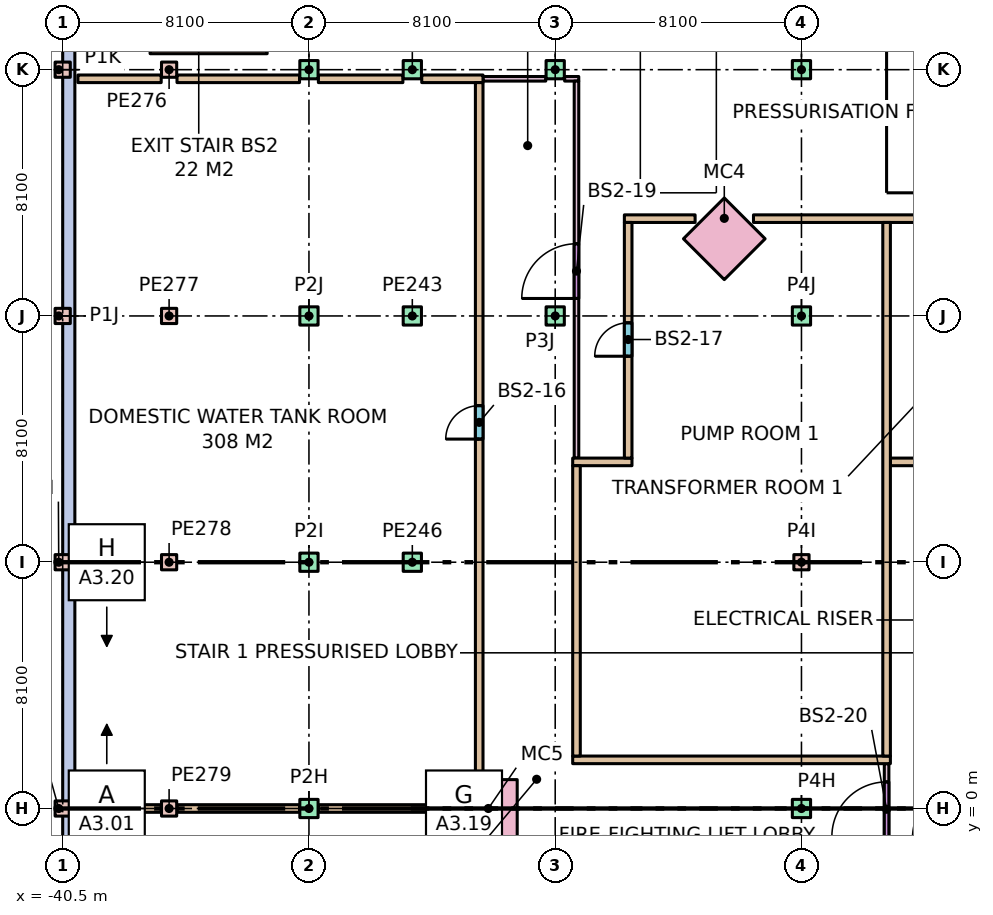
"""IFC4 building model, lengths in metres.
Left out: names, types, materials, properties, quantities, classifications, styles, units other than length and angle.
Written with IfcOpenShell. Run it as: python <this file> out.ifc"""

import sys

from ifc_helpers import new_model, si_unit, direction, frame, frame_2d, origin, origin_2d, place, context, subcontext, project, spatial, rectangle, extrude, element, fill, save


model = new_model("IFC4")
c1 = context("Model", 3, precision=1e-05, world=origin(), true_north=direction((0.0, 1.0)))
c2 = subcontext(c1, "Body", "Model", "MODEL_VIEW")
j1 = project(units=[si_unit("LENGTHUNIT", "METRE"), si_unit("PLANEANGLEUNIT", "RADIAN")], contexts=[c1])
p1 = place(None, origin())
s1 = spatial("IfcSite", under=j1, at=p1, CompositionType="ELEMENT")
p2 = place(p1, origin())
s2 = spatial("IfcBuilding", under=s1, at=p2, CompositionType="ELEMENT")
p3 = place(p2, frame((0.0, 0.0, -7.2)))
s3 = spatial("IfcBuildingStorey", under=s2, at=p3, CompositionType="ELEMENT", Elevation=-7.2)
p4 = place(p3, frame((-40.3, -56.3, 0.0), z_axis=(0.0, 0.0, 1.0), x_axis=(0.0, 1.0, 0.0)))
e1 = element("IfcWall", 1, at=p4, inside=s3, PredefinedType="SOLIDWALL", context=c2, shape_type="SweptSolid", body=[
    extrude(rectangle(XDim=112.6, YDim=0.4, at=frame_2d((56.3, 0.0))), origin(), (0.0, 0.0, 1.0), 3.6),
])
for number, where, z_axis, x_axis in (
    (2, (-40.5, 0.0, 0.0), (0.0, 0.0, 1.0), (1.0, 0.0, 0.0)),
    (3, (-40.5, 8.1, 0.0), (0.0, 0.0, 1.0), (1.0, 0.0, 0.0)),
    (4, (-40.5, 16.2, 0.0), (0.0, 0.0, 1.0), (1.0, 0.0, 0.0)),
    (5, (-40.5, 24.3, 0.0), (0.0, 0.0, 1.0), (1.0, 0.0, 0.0)),
):
    element("IfcColumn", number, at=place(p3, frame(where, z_axis=z_axis, x_axis=x_axis)), inside=s3, PredefinedType="COLUMN", context=c2, shape_type="SweptSolid", body=[
        extrude(rectangle(XDim=0.5, YDim=0.5, at=origin_2d()), origin(), (0.0, 0.0, 1.0), 3.6),
    ])
for number, where, z_axis, x_axis in (
    (6, (-32.4, 0.0, 0.0), (0.0, 0.0, 1.0), (1.0, 0.0, 0.0)),
    (7, (-32.4, 8.1, 0.0), (0.0, 0.0, 1.0), (1.0, 0.0, 0.0)),
    (8, (-32.4, 16.2, 0.0), (0.0, 0.0, 1.0), (1.0, 0.0, 0.0)),
    (9, (-32.4, 24.3, 0.0), (0.0, 0.0, 1.0), (1.0, 0.0, 0.0)),
    (10, (-24.3, 16.2, 0.0), (0.0, 0.0, 1.0), (1.0, 0.0, 0.0)),
    (11, (-24.3, 24.3, 0.0), (0.0, 0.0, 1.0), (1.0, 0.0, 0.0)),
    (12, (-16.2, 0.0, 0.0), (0.0, 0.0, 1.0), (1.0, 0.0, 0.0)),
):
    element("IfcColumn", number, at=place(p3, frame(where, z_axis=z_axis, x_axis=x_axis)), inside=s3, PredefinedType="COLUMN", context=c2, shape_type="SweptSolid", body=[
        extrude(rectangle(XDim=0.6, YDim=0.6, at=origin_2d()), origin(), (0.0, 0.0, 1.0), 3.6),
    ])
p5 = place(p3, frame((-16.2, 8.1, 0.0), z_axis=(0.0, 0.0, 1.0), x_axis=(1.0, 0.0, 0.0)))
e13 = element("IfcColumn", 13, at=p5, inside=s3, PredefinedType="COLUMN", context=c2, shape_type="SweptSolid", body=[
    extrude(rectangle(XDim=0.5, YDim=0.5, at=origin_2d()), origin(), (0.0, 0.0, 1.0), 3.6),
])
for number, where, z_axis, x_axis in (
    (14, (-16.2, 16.2, 0.0), (0.0, 0.0, 1.0), (1.0, 0.0, 0.0)),
    (15, (-16.2, 24.3, 0.0), (0.0, 0.0, 1.0), (1.0, 0.0, 0.0)),
    (16, (-29.0, 24.3, 0.0), (0.0, 0.0, 1.0), (1.0, 0.0, 0.0)),
    (17, (-29.0, 16.2, 0.0), (0.0, 0.0, 1.0), (1.0, 0.0, 0.0)),
    (18, (-29.0, 8.1, 0.0), (0.0, 0.0, 1.0), (1.0, 0.0, 0.0)),
):
    element("IfcColumn", number, at=place(p3, frame(where, z_axis=z_axis, x_axis=x_axis)), inside=s3, PredefinedType="COLUMN", context=c2, shape_type="SweptSolid", body=[
        extrude(rectangle(XDim=0.6, YDim=0.6, at=origin_2d()), origin(), (0.0, 0.0, 1.0), 3.6),
    ])
for number, where, z_axis, x_axis in (
    (19, (-37.0, 24.3, 0.0), (0.0, 0.0, 1.0), (1.0, 0.0, 0.0)),
    (20, (-37.0, 16.2, 0.0), (0.0, 0.0, 1.0), (1.0, 0.0, 0.0)),
    (21, (-37.0, 8.1, 0.0), (0.0, 0.0, 1.0), (1.0, 0.0, 0.0)),
    (22, (-37.0, 0.0, 0.0), (0.0, 0.0, 1.0), (1.0, 0.0, 0.0)),
):
    element("IfcColumn", number, at=place(p3, frame(where, z_axis=z_axis, x_axis=x_axis)), inside=s3, PredefinedType="COLUMN", context=c2, shape_type="SweptSolid", body=[
        extrude(rectangle(XDim=0.5, YDim=0.5, at=origin_2d()), origin(), (0.0, 0.0, 1.0), 3.6),
    ])
for number, where, z_axis, x_axis in (
    (23, (-18.738, 18.738, 0.0), (0.0, 0.0, 1.0), (-0.707, -0.707, 0.0)),
    (24, (-26.5, 0.0, 0.0), (0.0, 0.0, 1.0), (0.0, -1.0, 0.0)),
):
    element("IfcColumn", number, at=place(p3, frame(where, z_axis=z_axis, x_axis=x_axis)), inside=s3, PredefinedType="COLUMN", context=c2, shape_type="SweptSolid", body=[
        extrude(rectangle(XDim=1.9, YDim=1.9, at=origin_2d()), origin(), (0.0, 0.0, 1.0), 3.6),
    ])
p6 = place(p3, frame((-37.625, 24.95, 0.0), z_axis=(0.0, 0.0, 1.0), x_axis=(1.0, 0.0, 0.0)))
e25 = element("IfcWall", 25, at=p6, inside=s3, PredefinedType="STANDARD", context=c2, shape_type="SweptSolid", body=[
    extrude(rectangle(XDim=3.85, YDim=0.25, at=frame_2d((1.925, 0.0))), origin(), (0.0, 0.0, 1.0), 3.28),
])
p7 = place(p3, frame((-13.275, 11.4, 0.0), z_axis=(0.0, 0.0, 1.0), x_axis=(1.0, 0.0, 0.0)))
e26 = element("IfcWall", 26, at=p7, inside=s3, PredefinedType="PARTITIONING", context=c2, shape_type="SweptSolid", body=[
    extrude(rectangle(XDim=34.55, YDim=0.25, at=frame_2d((17.275, 0.0))), origin(), (0.0, 0.0, 1.0), 3.28),
])
p8 = place(p3, frame((-26.675, 24.0, 0.0), z_axis=(0.0, 0.0, 1.0), x_axis=(1.0, 0.0, 0.0)))
e27 = element("IfcWall", 27, at=p8, inside=s3, PredefinedType="PARTITIONING", context=c2, shape_type="SweptSolid", body=[
    extrude(rectangle(XDim=2.065, YDim=0.15, at=frame_2d((1.032, 0.0))), origin(), (0.0, 0.0, 1.0), 3.28),
])
p9 = place(p3, frame((-23.99, 24.0, 0.0), z_axis=(0.0, 0.0, 1.0), x_axis=(1.0, 0.0, 0.0)))
e28 = element("IfcWall", 28, at=p9, inside=s3, PredefinedType="PARTITIONING", context=c2, shape_type="SweptSolid", body=[
    extrude(rectangle(XDim=0.465, YDim=0.15, at=frame_2d((0.232, 0.0))), origin(), (0.0, 0.0, 1.0), 3.28),
])
p10 = place(p3, frame((-23.6, 11.525, 0.0), z_axis=(0.0, 0.0, 1.0), x_axis=(0.0, 1.0, 0.0)))
e29 = element("IfcWall", 29, at=p10, inside=s3, PredefinedType="PARTITIONING", context=c2, shape_type="SweptSolid", body=[
    extrude(rectangle(XDim=12.4, YDim=0.15, at=frame_2d((6.2, 0.0))), origin(), (0.0, 0.0, 1.0), 3.28),
])
p11 = place(p10, frame((5.25, 0.0, 0.0)))
e30 = element("IfcOpeningElement", 30, at=p11, cuts=e29, PredefinedType="OPENING", context=c2, shape_type="SweptSolid", body=[
    extrude(rectangle(XDim=1.8, YDim=2.4, at=frame_2d((0.9, 1.2))), frame((0.0, 0.085, 0.0), z_axis=(0.0, -1.0, 0.0), x_axis=(1.0, 0.0, 0.0)), (0.0, 0.0, 1.0), 0.17),
])
p12 = place(p3, frame((-40.0, 24.0, 0.0), z_axis=(0.0, 0.0, 1.0), x_axis=(1.0, 0.0, 0.0)))
e31 = element("IfcWall", 31, at=p12, inside=s3, PredefinedType="PARTITIONING", context=c2, shape_type="SweptSolid", body=[
    extrude(rectangle(XDim=2.74, YDim=0.25, at=frame_2d((1.37, 0.0))), origin(), (0.0, 0.0, 1.0), 3.28),
])
p13 = place(p3, frame((-36.74, 24.0, 0.0), z_axis=(0.0, 0.0, 1.0), x_axis=(1.0, 0.0, 0.0)))
e32 = element("IfcWall", 32, at=p13, inside=s3, PredefinedType="PARTITIONING", context=c2, shape_type="SweptSolid", body=[
    extrude(rectangle(XDim=4.03, YDim=0.25, at=frame_2d((2.015, 0.0))), origin(), (0.0, 0.0, 1.0), 3.28),
])
p14 = place(p3, frame((-32.09, 24.0, 0.0), z_axis=(0.0, 0.0, 1.0), x_axis=(1.0, 0.0, 0.0)))
e33 = element("IfcWall", 33, at=p14, inside=s3, PredefinedType="PARTITIONING", context=c2, shape_type="SweptSolid", body=[
    extrude(rectangle(XDim=2.78, YDim=0.25, at=frame_2d((1.39, 0.0))), origin(), (0.0, 0.0, 1.0), 3.28),
])
p15 = place(p3, frame((-28.69, 24.0, 0.0), z_axis=(0.0, 0.0, 1.0), x_axis=(1.0, 0.0, 0.0)))
e34 = element("IfcWall", 34, at=p15, inside=s3, PredefinedType="PARTITIONING", context=c2, shape_type="SweptSolid", body=[
    extrude(rectangle(XDim=2.015, YDim=0.25, at=frame_2d((1.007, 0.0))), origin(), (0.0, 0.0, 1.0), 3.28),
])
p16 = place(p3, frame((-23.725, 11.4, 0.0), z_axis=(0.0, 0.0, 1.0), x_axis=(1.0, 0.0, 0.0)))
e35 = element("IfcWall", 35, at=p16, inside=s3, PredefinedType="PARTITIONING", context=c2, shape_type="SweptSolid", body=[
    extrude(rectangle(XDim=1.95, YDim=0.25, at=frame_2d((0.975, 0.0))), origin(), (0.0, 0.0, 1.0), 3.28),
])
p17 = place(p3, frame((-22.025, 19.4, 0.0), z_axis=(0.0, 0.0, 1.0), x_axis=(1.0, 0.0, 0.0)))
e36 = element("IfcWall", 36, at=p17, inside=s3, PredefinedType="PARTITIONING", context=c2, shape_type="SweptSolid", body=[
    extrude(rectangle(XDim=2.327, YDim=0.25, at=frame_2d((1.163, 0.0))), origin(), (0.0, 0.0, 1.0), 3.28),
])
p18 = place(p3, frame((-17.778, 19.4, 0.0), z_axis=(0.0, 0.0, 1.0), x_axis=(1.0, 0.0, 0.0)))
e37 = element("IfcWall", 37, at=p18, inside=s3, PredefinedType="PARTITIONING", context=c2, shape_type="SweptSolid", body=[
    extrude(rectangle(XDim=35.557, YDim=0.25, at=frame_2d((17.778, 0.0))), origin(), (0.0, 0.0, 1.0), 3.28),
])
p19 = place(p18, frame((7.553, 0.0, 0.0)))
e38 = element("IfcOpeningElement", 38, at=p19, cuts=e37, PredefinedType="OPENING", context=c2, shape_type="SweptSolid", body=[
    extrude(rectangle(XDim=1.1, YDim=2.1, at=frame_2d((0.55, 1.05))), frame((0.0, 0.135, 0.0), z_axis=(0.0, -1.0, 0.0), x_axis=(1.0, 0.0, 0.0)), (0.0, 0.0, 1.0), 0.27),
])
p20 = place(p18, frame((14.7, 0.0, 0.0)))
e39 = element("IfcOpeningElement", 39, at=p20, cuts=e37, PredefinedType="OPENING", context=c2, shape_type="SweptSolid", body=[
    extrude(rectangle(XDim=1.1, YDim=2.1, at=frame_2d((0.55, 1.05))), frame((0.0, 0.135, 0.0), z_axis=(0.0, -1.0, 0.0), x_axis=(1.0, 0.0, 0.0)), (0.0, 0.0, 1.0), 0.27),
])
p21 = place(p18, frame((21.847, 0.0, 0.0)))
e40 = element("IfcOpeningElement", 40, at=p21, cuts=e37, PredefinedType="OPENING", context=c2, shape_type="SweptSolid", body=[
    extrude(rectangle(XDim=1.1, YDim=2.1, at=frame_2d((0.55, 1.05))), frame((0.0, 0.135, 0.0), z_axis=(0.0, -1.0, 0.0), x_axis=(1.0, 0.0, 0.0)), (0.0, 0.0, 1.0), 0.27),
])
p22 = place(p18, frame((30.193, 0.0, 0.0)))
e41 = element("IfcOpeningElement", 41, at=p22, cuts=e37, PredefinedType="OPENING", context=c2, shape_type="SweptSolid", body=[
    extrude(rectangle(XDim=1.1, YDim=2.1, at=frame_2d((0.55, 1.05))), frame((0.0, 0.135, 0.0), z_axis=(0.0, -1.0, 0.0), x_axis=(1.0, 0.0, 0.0)), (0.0, 0.0, 1.0), 0.27),
])
p23 = place(p3, frame((-21.9, 11.525, 0.0), z_axis=(0.0, 0.0, 1.0), x_axis=(0.0, 1.0, 0.0)))
e42 = element("IfcWall", 42, at=p23, inside=s3, PredefinedType="PARTITIONING", context=c2, shape_type="SweptSolid", body=[
    extrude(rectangle(XDim=7.75, YDim=0.25, at=frame_2d((3.875, 0.0))), origin(), (0.0, 0.0, 1.0), 3.28),
])
p24 = place(p23, frame((3.35, 0.0, 0.0)))
e43 = element("IfcOpeningElement", 43, at=p24, cuts=e42, PredefinedType="OPENING", context=c2, shape_type="SweptSolid", body=[
    extrude(rectangle(XDim=1.1, YDim=2.1, at=frame_2d((0.55, 1.05))), frame((0.0, 0.135, 0.0), z_axis=(0.0, -1.0, 0.0), x_axis=(1.0, 0.0, 0.0)), (0.0, 0.0, 1.0), 0.27),
])
p25 = place(p3, frame((-13.4, -1.475, 0.0), z_axis=(0.0, 0.0, 1.0), x_axis=(0.0, 1.0, 0.0)))
e44 = element("IfcWall", 44, at=p25, inside=s3, PredefinedType="PARTITIONING", context=c2, shape_type="SweptSolid", body=[
    extrude(rectangle(XDim=2.95, YDim=0.15, at=frame_2d((1.475, 0.0))), origin(), (0.0, 0.0, 1.0), 3.28),
])
p26 = place(p25, frame((0.55, 0.0, 0.0)))
e45 = element("IfcOpeningElement", 45, at=p26, cuts=e44, PredefinedType="OPENING", context=c2, shape_type="SweptSolid", body=[
    extrude(rectangle(XDim=1.8, YDim=2.4, at=frame_2d((0.9, 1.2))), frame((0.0, 0.085, 0.0), z_axis=(0.0, -1.0, 0.0), x_axis=(1.0, 0.0, 0.0)), (0.0, 0.0, 1.0), 0.17),
])
p27 = place(p3, frame((-26.8, 0.96, 0.0), z_axis=(0.0, 0.0, 1.0), x_axis=(0.0, 1.0, 0.0)))
e46 = element("IfcWall", 46, at=p27, inside=s3, PredefinedType="PARTITIONING", context=c2, shape_type="SweptSolid", body=[
    extrude(rectangle(XDim=22.915, YDim=0.25, at=frame_2d((11.458, 0.0))), origin(), (0.0, 0.0, 1.0), 3.28),
])
p28 = place(p27, frame((11.19, 0.0, 0.0)))
e47 = element("IfcOpeningElement", 47, at=p28, cuts=e46, PredefinedType="OPENING", context=c2, shape_type="SweptSolid", body=[
    extrude(rectangle(XDim=1.1, YDim=2.1, at=frame_2d((0.55, 1.05))), frame((0.0, 0.135, 0.0), z_axis=(0.0, -1.0, 0.0), x_axis=(1.0, 0.0, 0.0)), (0.0, 0.0, 1.0), 0.27),
])
p29 = place(p3, frame((-23.725, 1.6, 0.0), z_axis=(0.0, 0.0, 1.0), x_axis=(1.0, 0.0, 0.0)))
e48 = element("IfcWall", 48, at=p29, inside=s3, PredefinedType="PARTITIONING", context=c2, shape_type="SweptSolid", body=[
    extrude(rectangle(XDim=10.45, YDim=0.25, at=frame_2d((5.225, 0.0))), origin(), (0.0, 0.0, 1.0), 3.28),
])
p30 = place(p3, frame((-23.6, 1.725, 0.0), z_axis=(0.0, 0.0, 1.0), x_axis=(0.0, 1.0, 0.0)))
e49 = element("IfcWall", 49, at=p30, inside=s3, PredefinedType="PARTITIONING", context=c2, shape_type="SweptSolid", body=[
    extrude(rectangle(XDim=9.55, YDim=0.25, at=frame_2d((4.775, 0.0))), origin(), (0.0, 0.0, 1.0), 3.28),
])
p31 = place(p3, frame((-13.4, 1.725, 0.0), z_axis=(0.0, 0.0, 1.0), x_axis=(0.0, 1.0, 0.0)))
e50 = element("IfcWall", 50, at=p31, inside=s3, PredefinedType="PARTITIONING", context=c2, shape_type="SweptSolid", body=[
    extrude(rectangle(XDim=17.55, YDim=0.25, at=frame_2d((8.775, 0.0))), origin(), (0.0, 0.0, 1.0), 3.28),
])
p32 = place(p3, frame((-40.0, 0.0, 0.0), z_axis=(0.0, 0.0, 1.0), x_axis=(1.0, 0.0, 0.0)))
e51 = element("IfcWall", 51, at=p32, inside=s3, PredefinedType="PARTITIONING", context=c2, shape_type="SweptSolid", body=[
    extrude(rectangle(XDim=2.74, YDim=0.25, at=frame_2d((1.37, 0.0))), origin(), (0.0, 0.0, 1.0), 3.28),
])
p33 = place(p3, frame((-36.74, 0.0, 0.0), z_axis=(0.0, 0.0, 1.0), x_axis=(1.0, 0.0, 0.0)))
e52 = element("IfcWall", 52, at=p33, inside=s3, PredefinedType="PARTITIONING", context=c2, shape_type="SweptSolid", body=[
    extrude(rectangle(XDim=4.03, YDim=0.25, at=frame_2d((2.015, 0.0))), origin(), (0.0, 0.0, 1.0), 3.28),
])
p34 = place(p3, frame((-32.09, 0.0, 0.0), z_axis=(0.0, 0.0, 1.0), x_axis=(1.0, 0.0, 0.0)))
e53 = element("IfcWall", 53, at=p34, inside=s3, PredefinedType="PARTITIONING", context=c2, shape_type="SweptSolid", body=[
    extrude(rectangle(XDim=4.63, YDim=0.25, at=frame_2d((2.315, 0.0))), origin(), (0.0, 0.0, 1.0), 3.28),
])
p35 = place(p28, origin())
e54 = element("IfcDoor", 54, at=p35, inside=s3, OperationType="SINGLE_SWING_LEFT", PredefinedType="DOOR", context=c2, shape_type="SweptSolid", body=[
    extrude(rectangle(XDim=1.1, YDim=2.1, at=frame_2d((0.55, 1.05))), frame((0.0, 0.025, 0.0), z_axis=(0.0, -1.0, 0.0), x_axis=(1.0, 0.0, 0.0)), (0.0, 0.0, 1.0), 0.05),
])
fill(e47, e54)
p36 = place(p24, origin())
e55 = element("IfcDoor", 55, at=p36, inside=s3, OperationType="SINGLE_SWING_LEFT", PredefinedType="DOOR", context=c2, shape_type="SweptSolid", body=[
    extrude(rectangle(XDim=1.1, YDim=2.1, at=frame_2d((0.55, 1.05))), frame((0.0, 0.025, 0.0), z_axis=(0.0, -1.0, 0.0), x_axis=(1.0, 0.0, 0.0)), (0.0, 0.0, 1.0), 0.05),
])
fill(e43, e55)
p37 = place(p11, origin())
e56 = element("IfcDoor", 56, at=p37, inside=s3, OperationType="SINGLE_SWING_LEFT", PredefinedType="DOOR", context=c2, shape_type="SweptSolid", body=[
    extrude(rectangle(XDim=1.8, YDim=2.4, at=frame_2d((0.9, 1.2))), frame((0.0, 0.025, 0.0), z_axis=(0.0, -1.0, 0.0), x_axis=(1.0, 0.0, 0.0)), (0.0, 0.0, 1.0), 0.05),
])
fill(e30, e56)
p38 = place(p26, origin())
e57 = element("IfcDoor", 57, at=p38, inside=s3, OperationType="SINGLE_SWING_LEFT", PredefinedType="DOOR", context=c2, shape_type="SweptSolid", body=[
    extrude(rectangle(XDim=1.8, YDim=2.4, at=frame_2d((0.9, 1.2))), frame((0.0, 0.025, 0.0), z_axis=(0.0, -1.0, 0.0), x_axis=(1.0, 0.0, 0.0)), (0.0, 0.0, 1.0), 0.05),
])
fill(e45, e57)
save(model, sys.argv[1])
